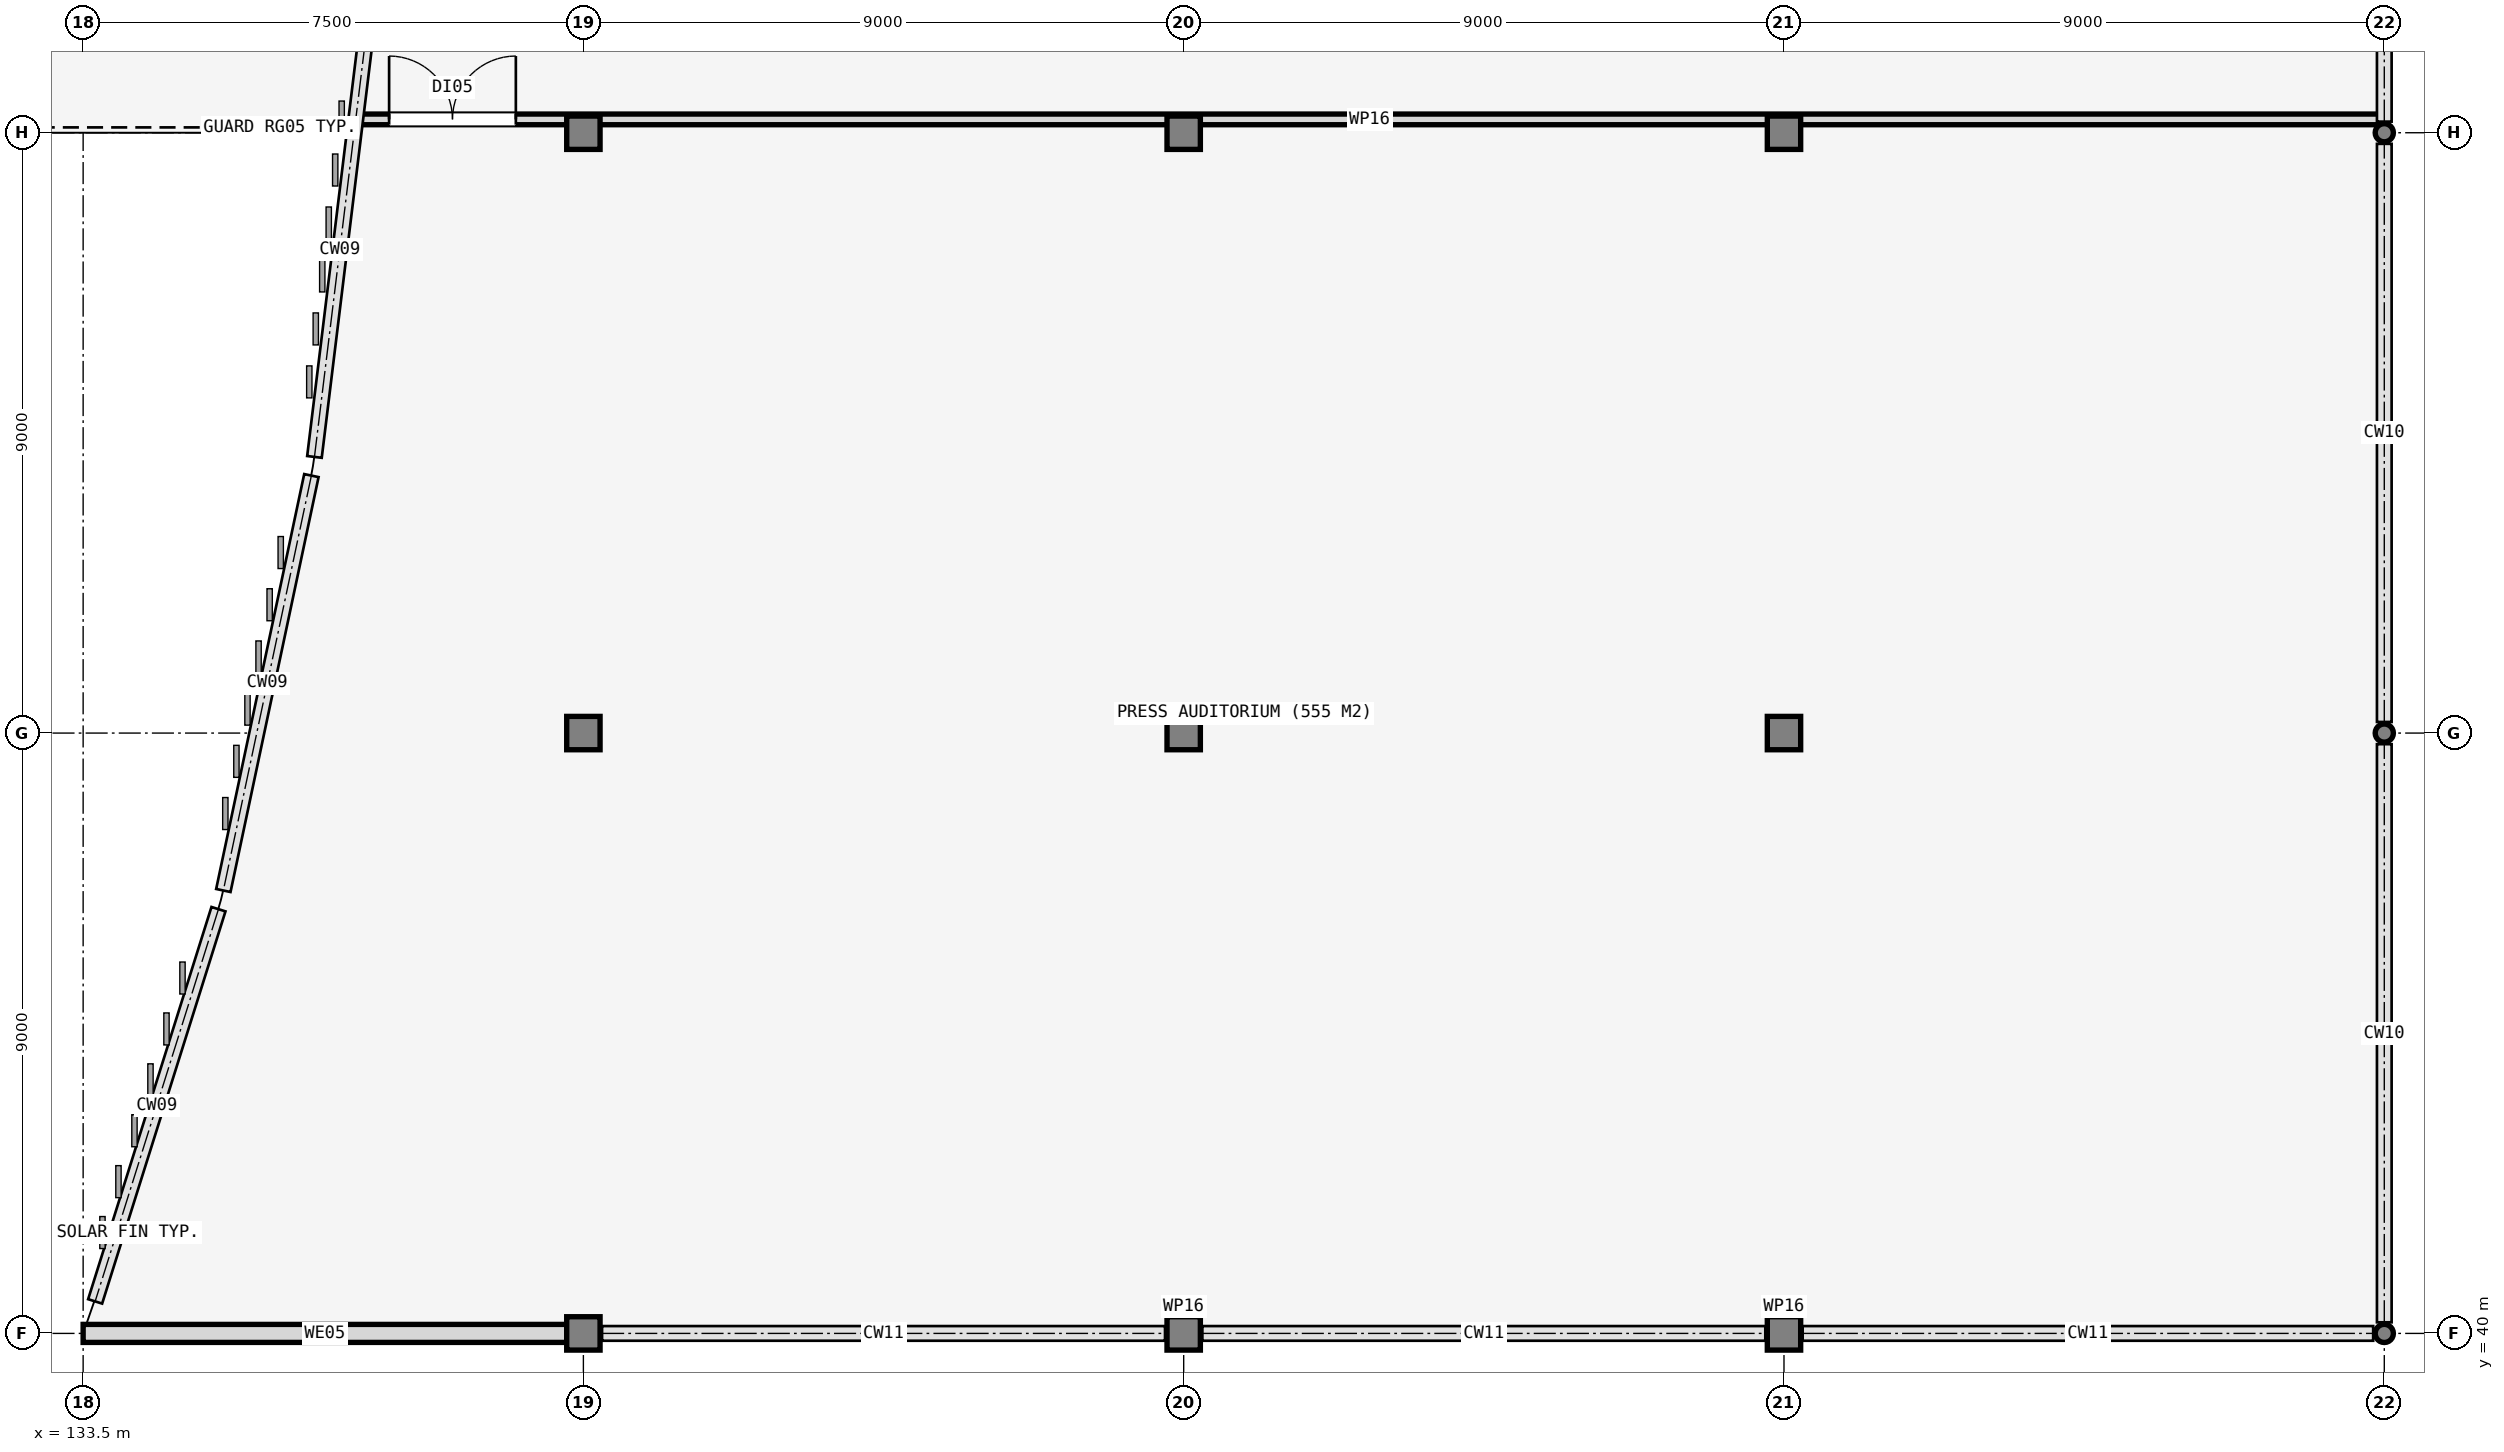
"""IFC4 building model, lengths in metres.
Left out: names, types, materials, properties, quantities, classifications, styles, units other than length and angle.
Written with IfcOpenShell. Run it as: python <this file> out.ifc"""

import sys

from ifc_helpers import new_model, si_unit, direction, frame, frame_2d, origin, origin_2d, place, context, subcontext, project, spatial, rectangle, hollow_circle, extrude, element, fill, save


model = new_model("IFC4")
c1 = context("Model", 3, precision=1e-05, world=origin(), true_north=direction((0.0, 1.0)))
c2 = subcontext(c1, "Body", "Model", "MODEL_VIEW")
j1 = project(units=[si_unit("LENGTHUNIT", "METRE"), si_unit("PLANEANGLEUNIT", "RADIAN")], contexts=[c1])
p1 = place(None, origin())
s1 = spatial("IfcSite", under=j1, at=p1, CompositionType="ELEMENT")
p2 = place(p1, origin())
s2 = spatial("IfcBuilding", under=s1, at=p2, CompositionType="ELEMENT")
p3 = place(p2, frame((0.0, 0.0, 9.3)))
s3 = spatial("IfcBuildingStorey", under=s2, at=p3, CompositionType="ELEMENT", Elevation=9.3)
for number, where, z_axis, x_axis in (
    (1, (141.0, 40.0, 0.0), (0.0, 0.0, 1.0), (1.0, 0.0, 0.0)),
    (2, (141.0, 49.0, 0.0), (0.0, 0.0, 1.0), (1.0, 0.0, 0.0)),
    (3, (141.0, 58.0, 0.0), (0.0, 0.0, 1.0), (1.0, 0.0, 0.0)),
    (4, (150.0, 40.0, 0.0), (0.0, 0.0, 1.0), (1.0, 0.0, 0.0)),
    (5, (150.0, 49.0, 0.0), (0.0, 0.0, 1.0), (1.0, 0.0, 0.0)),
    (6, (150.0, 58.0, 0.0), (0.0, 0.0, 1.0), (1.0, 0.0, 0.0)),
    (7, (159.0, 40.0, 0.0), (0.0, 0.0, 1.0), (1.0, 0.0, 0.0)),
    (8, (159.0, 49.0, 0.0), (0.0, 0.0, 1.0), (1.0, 0.0, 0.0)),
    (9, (159.0, 58.0, 0.0), (0.0, 0.0, 1.0), (1.0, 0.0, 0.0)),
):
    element("IfcColumn", number, at=place(p3, frame(where, z_axis=z_axis, x_axis=x_axis)), inside=s3, PredefinedType="COLUMN", context=c2, shape_type="SweptSolid", body=[
        extrude(rectangle(XDim=0.5, YDim=0.5, at=origin_2d()), origin(), (0.0, 0.0, 1.0), 4.2),
    ])
for number, where, z_axis, x_axis in (
    (10, (168.0, 40.0, 0.0), (0.0, 0.0, 1.0), (1.0, 0.0, 0.0)),
    (11, (168.0, 49.0, 0.0), (0.0, 0.0, 1.0), (1.0, 0.0, 0.0)),
    (12, (168.0, 58.0, 0.0), (0.0, 0.0, 1.0), (1.0, 0.0, 0.0)),
):
    element("IfcColumn", number, at=place(p3, frame(where, z_axis=z_axis, x_axis=x_axis)), inside=s3, PredefinedType="COLUMN", context=c2, shape_type="SweptSolid", body=[
        extrude(hollow_circle(Radius=0.136, WallThickness=0.012, at=origin_2d()), origin(), (0.0, 0.0, 1.0), 4.2),
    ])
p4 = place(p3, frame((133.5, 40.0, 0.0), z_axis=(0.0, 0.0, 1.0), x_axis=(1.0, 0.0, 0.0)))
e13 = element("IfcWall", 13, at=p4, inside=s3, PredefinedType="SOLIDWALL", context=c2, shape_type="SweptSolid", body=[
    extrude(rectangle(XDim=7.25, YDim=0.27, at=frame_2d((3.625, 0.0))), origin(), (0.0, 0.0, 1.0), 3.22),
])
p5 = place(p3, frame((137.655, 58.2, 0.0), z_axis=(0.0, 0.0, 1.0), x_axis=(1.0, 0.0, 0.0)))
e14 = element("IfcWall", 14, at=p5, inside=s3, PredefinedType="PARTITIONING", context=c2, shape_type="SweptSolid", body=[
    extrude(rectangle(XDim=30.265, YDim=0.16, at=frame_2d((15.133, 0.0))), origin(), (0.0, 0.0, 1.0), 3.12),
])
p6 = place(p5, frame((0.433, 0.0, 0.0)))
e15 = element("IfcOpeningElement", 15, at=p6, cuts=e14, PredefinedType="OPENING", context=c2, shape_type="SweptSolid", body=[
    extrude(rectangle(XDim=1.9, YDim=2.25, at=frame_2d((0.95, 1.125))), frame((0.0, 0.09, 0.0), z_axis=(0.0, -1.0, 0.0), x_axis=(1.0, 0.0, 0.0)), (0.0, 0.0, 1.0), 0.18),
])
for number, where, z_axis, x_axis in (
    (16, (150.28, 40.4, 0.0), (0.0, 0.0, 1.0), (-1.0, 0.0, 0.0)),
    (17, (159.28, 40.4, 0.0), (0.0, 0.0, 1.0), (-1.0, 0.0, 0.0)),
):
    element("IfcWall", number, at=place(p3, frame(where, z_axis=z_axis, x_axis=x_axis)), inside=s3, PredefinedType="PARTITIONING", context=c2, shape_type="SweptSolid", body=[
        extrude(rectangle(XDim=0.56, YDim=0.16, at=frame_2d((0.28, 0.0))), origin(), (0.0, 0.0, 1.0), 3.12),
    ])
p7 = place(p6, origin())
e18 = element("IfcDoor", 18, at=p7, inside=s3, OperationType="DOUBLE_DOOR_SINGLE_SWING", PredefinedType="DOOR", context=c2, shape_type="SweptSolid", body=[
    extrude(rectangle(XDim=1.9, YDim=2.25, at=frame_2d((0.95, 1.125))), frame((0.0, 0.025, 0.0), z_axis=(0.0, -1.0, 0.0), x_axis=(1.0, 0.0, 0.0)), (0.0, 0.0, 1.0), 0.05),
])
fill(e15, e18)
save(model, sys.argv[1])
